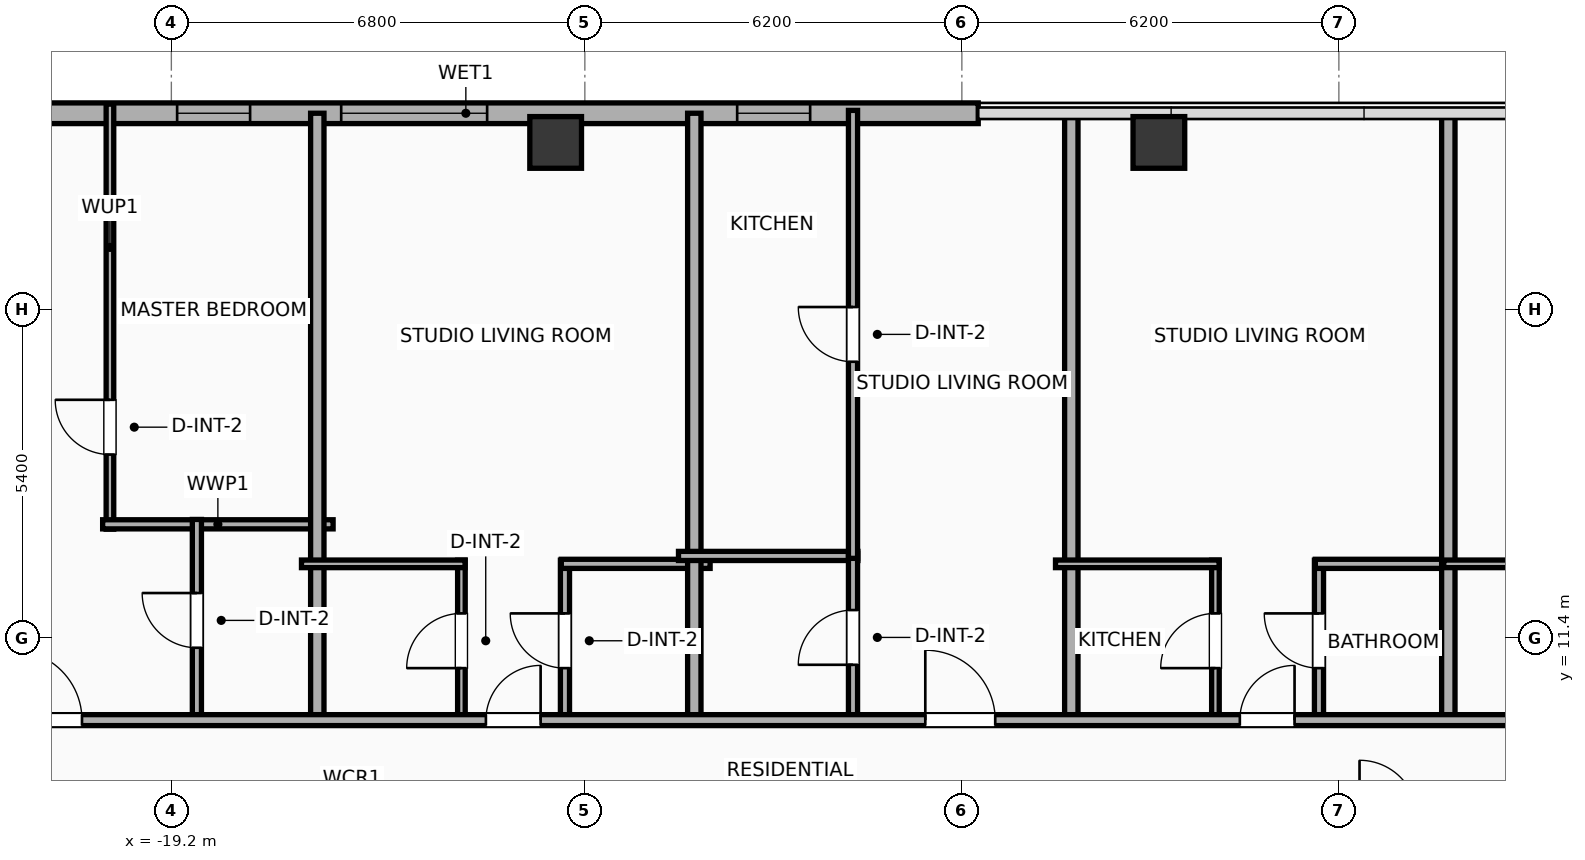
"""IFC4 building model, lengths in metres.
Left out: names, types, materials, properties, quantities, classifications, styles, units other than length and angle.
Written with IfcOpenShell. Run it as: python <this file> out.ifc"""

import sys

from ifc_helpers import new_model, si_unit, direction, frame, frame_2d, origin, origin_2d, place, context, subcontext, project, spatial, rectangle, hollow_rectangle, extrude, element, fill, save


model = new_model("IFC4")
c1 = context("Model", 3, precision=1e-05, world=origin(), true_north=direction((0.0, 1.0)))
c2 = subcontext(c1, "Body", "Model", "MODEL_VIEW")
j1 = project(units=[si_unit("LENGTHUNIT", "METRE"), si_unit("PLANEANGLEUNIT", "RADIAN")], contexts=[c1])
p1 = place(None, origin())
s1 = spatial("IfcSite", under=j1, at=p1, CompositionType="ELEMENT")
p2 = place(p1, origin())
s2 = spatial("IfcBuilding", under=s1, at=p2, CompositionType="ELEMENT")
p3 = place(p2, frame((0.0, 0.0, 211.9)))
s3 = spatial("IfcBuildingStorey", under=s2, at=p3, CompositionType="ELEMENT", Elevation=211.9)
for number, where, z_axis, x_axis in (
    (1, (-2.96, 19.55, 0.0), (0.0, 0.0, 1.0), (1.0, 0.0, 0.0)),
    (2, (-12.88, 19.55, 0.0), (0.0, 0.0, 1.0), (1.0, 0.0, 0.0)),
):
    element("IfcColumn", number, at=place(p3, frame(where, z_axis=z_axis, x_axis=x_axis)), inside=s3, PredefinedType="COLUMN", context=c2, shape_type="SweptSolid", body=[
        extrude(hollow_rectangle(XDim=0.85, YDim=0.85, WallThickness=0.028, at=origin_2d()), origin(), (0.0, 0.0, 1.0), 3.9),
    ])
p4 = place(p3, frame((-22.783, 20.03, 0.0), z_axis=(0.0, 0.0, 1.0), x_axis=(1.0, 0.0, 0.0)))
e3 = element("IfcWall", 3, at=p4, inside=s3, PredefinedType="ELEMENTEDWALL", context=c2, shape_type="SweptSolid", body=[
    extrude(rectangle(XDim=16.853, YDim=0.34, at=frame_2d((8.426, 0.0))), origin(), (0.0, 0.0, 1.0), 3.65),
])
p5 = place(p4, frame((6.376, 0.0, 0.75)))
e4 = element("IfcOpeningElement", 4, at=p5, cuts=e3, PredefinedType="OPENING", context=c2, shape_type="SweptSolid", body=[
    extrude(rectangle(XDim=2.4, YDim=2.1, at=frame_2d((1.2, 1.05))), frame((0.0, 0.18, 0.0), z_axis=(0.0, -1.0, 0.0), x_axis=(1.0, 0.0, 0.0)), (0.0, 0.0, 1.0), 0.36),
])
p6 = place(p4, frame((3.678, 0.0, 0.75)))
e5 = element("IfcOpeningElement", 5, at=p6, cuts=e3, PredefinedType="OPENING", context=c2, shape_type="SweptSolid", body=[
    extrude(rectangle(XDim=1.2, YDim=2.05, at=frame_2d((0.6, 1.025))), frame((0.0, 0.18, 0.0), z_axis=(0.0, -1.0, 0.0), x_axis=(1.0, 0.0, 0.0)), (0.0, 0.0, 1.0), 0.36),
])
p7 = place(p4, frame((12.888, 0.0, 0.75)))
e6 = element("IfcOpeningElement", 6, at=p7, cuts=e3, PredefinedType="OPENING", context=c2, shape_type="SweptSolid", body=[
    extrude(rectangle(XDim=1.2, YDim=2.05, at=frame_2d((0.6, 1.025))), frame((0.0, 0.18, 0.0), z_axis=(0.0, -1.0, 0.0), x_axis=(1.0, 0.0, 0.0)), (0.0, 0.0, 1.0), 0.36),
])
p8 = place(p3, frame((-20.21, 13.19, 0.0), z_axis=(0.0, 0.0, 1.0), x_axis=(0.0, 1.0, 0.0)))
e7 = element("IfcWall", 7, at=p8, inside=s3, PredefinedType="PARTITIONING", context=c2, shape_type="SweptSolid", body=[
    extrude(rectangle(XDim=6.99, YDim=0.125, at=frame_2d((3.495, 0.0))), origin(), (0.0, 0.0, 1.0), 3.65),
])
p9 = place(p8, frame((1.228, 0.0, 0.0)))
e8 = element("IfcOpeningElement", 8, at=p9, cuts=e7, PredefinedType="OPENING", context=c2, shape_type="SweptSolid", body=[
    extrude(rectangle(XDim=0.9, YDim=2.05, at=frame_2d((0.45, 1.025))), frame((0.0, 0.073, 0.0), z_axis=(0.0, -1.0, 0.0), x_axis=(1.0, 0.0, 0.0)), (0.0, 0.0, 1.0), 0.145),
])
p10 = place(p3, frame((-20.33, 13.27, 0.0), z_axis=(0.0, 0.0, 1.0), x_axis=(1.0, 0.0, 0.0)))
e9 = element("IfcWall", 9, at=p10, inside=s3, PredefinedType="PLUMBINGWALL", context=c2, shape_type="SweptSolid", body=[
    extrude(rectangle(XDim=3.79, YDim=0.15, at=frame_2d((1.895, 0.0))), origin(), (0.0, 0.0, 1.0), 3.65),
])
p11 = place(p3, frame((-18.78, 10.03, 0.0), z_axis=(0.0, 0.0, 1.0), x_axis=(0.0, 1.0, 0.0)))
e10 = element("IfcWall", 10, at=p11, inside=s3, PredefinedType="PLUMBINGWALL", context=c2, shape_type="SweptSolid", body=[
    extrude(rectangle(XDim=3.32, YDim=0.15, at=frame_2d((1.66, 0.0))), origin(), (0.0, 0.0, 1.0), 3.65),
])
p12 = place(p11, frame((1.21, 0.0, 0.0)))
e11 = element("IfcOpeningElement", 11, at=p12, cuts=e10, PredefinedType="OPENING", context=c2, shape_type="SweptSolid", body=[
    extrude(rectangle(XDim=0.9, YDim=2.05, at=frame_2d((0.45, 1.025))), frame((0.0, 0.085, 0.0), z_axis=(0.0, -1.0, 0.0), x_axis=(1.0, 0.0, 0.0)), (0.0, 0.0, 1.0), 0.17),
])
p13 = place(p3, frame((-16.8, 9.97, 0.0), z_axis=(0.0, 0.0, 1.0), x_axis=(0.0, 1.0, 0.0)))
e12 = element("IfcWall", 12, at=p13, inside=s3, PredefinedType="PARTITIONING", context=c2, shape_type="SweptSolid", body=[
    extrude(rectangle(XDim=10.06, YDim=0.22, at=frame_2d((5.03, 0.0))), origin(), (0.0, 0.0, 1.0), 3.65),
])
p14 = place(p3, frame((-14.43, 10.03, 0.0), z_axis=(0.0, 0.0, 1.0), x_axis=(0.0, 1.0, 0.0)))
e13 = element("IfcWall", 13, at=p14, inside=s3, PredefinedType="PARTITIONING", context=c2, shape_type="SweptSolid", body=[
    extrude(rectangle(XDim=2.65, YDim=0.125, at=frame_2d((1.325, 0.0))), origin(), (0.0, 0.0, 1.0), 3.65),
])
p15 = place(p14, frame((0.875, 0.0, 0.0)))
e14 = element("IfcOpeningElement", 14, at=p15, cuts=e13, PredefinedType="OPENING", context=c2, shape_type="SweptSolid", body=[
    extrude(rectangle(XDim=0.9, YDim=2.05, at=frame_2d((0.45, 1.025))), frame((0.0, 0.073, 0.0), z_axis=(0.0, -1.0, 0.0), x_axis=(1.0, 0.0, 0.0)), (0.0, 0.0, 1.0), 0.145),
])
p16 = place(p3, frame((-12.727, 10.03, 0.0), z_axis=(0.0, 0.0, 1.0), x_axis=(0.0, 1.0, 0.0)))
e15 = element("IfcWall", 15, at=p16, inside=s3, PredefinedType="PLUMBINGWALL", context=c2, shape_type="SweptSolid", body=[
    extrude(rectangle(XDim=2.65, YDim=0.15, at=frame_2d((1.325, 0.0))), origin(), (0.0, 0.0, 1.0), 3.09),
])
p17 = place(p16, frame((0.875, 0.0, 0.0)))
e16 = element("IfcOpeningElement", 16, at=p17, cuts=e15, PredefinedType="OPENING", context=c2, shape_type="SweptSolid", body=[
    extrude(rectangle(XDim=0.9, YDim=2.05, at=frame_2d((0.45, 1.025))), frame((0.0, 0.085, 0.0), z_axis=(0.0, -1.0, 0.0), x_axis=(1.0, 0.0, 0.0)), (0.0, 0.0, 1.0), 0.17),
])
p18 = place(p3, frame((-17.06, 12.62, 0.0), z_axis=(0.0, 0.0, 1.0), x_axis=(1.0, 0.0, 0.0)))
e17 = element("IfcWall", 17, at=p18, inside=s3, PredefinedType="PARTITIONING", context=c2, shape_type="SweptSolid", body=[
    extrude(rectangle(XDim=2.69, YDim=0.125, at=frame_2d((1.345, 0.0))), origin(), (0.0, 0.0, 1.0), 3.65),
])
p19 = place(p3, frame((-12.787, 12.62, 0.0), z_axis=(0.0, 0.0, 1.0), x_axis=(1.0, 0.0, 0.0)))
e18 = element("IfcWall", 18, at=p19, inside=s3, PredefinedType="PLUMBINGWALL", context=c2, shape_type="SweptSolid", body=[
    extrude(rectangle(XDim=2.447, YDim=0.15, at=frame_2d((1.224, 0.0))), origin(), (0.0, 0.0, 1.0), 3.65),
])
p20 = place(p3, frame((-10.6, 9.97, 0.0), z_axis=(0.0, 0.0, 1.0), x_axis=(0.0, 1.0, 0.0)))
e19 = element("IfcWall", 19, at=p20, inside=s3, PredefinedType="PARTITIONING", context=c2, shape_type="SweptSolid", body=[
    extrude(rectangle(XDim=10.06, YDim=0.22, at=frame_2d((5.03, 0.0))), origin(), (0.0, 0.0, 1.0), 3.65),
])
p21 = place(p3, frame((-10.86, 12.75, 0.0), z_axis=(0.0, 0.0, 1.0), x_axis=(1.0, 0.0, 0.0)))
e20 = element("IfcWall", 20, at=p21, inside=s3, PredefinedType="PLUMBINGWALL", context=c2, shape_type="SweptSolid", body=[
    extrude(rectangle(XDim=2.95, YDim=0.15, at=frame_2d((1.475, 0.0))), origin(), (0.0, 0.0, 1.0), 3.65),
])
p22 = place(p3, frame((-7.99, 10.03, 0.0), z_axis=(0.0, 0.0, 1.0), x_axis=(0.0, 1.0, 0.0)))
e21 = element("IfcWall", 21, at=p22, inside=s3, PredefinedType="PLUMBINGWALL", context=c2, shape_type="SweptSolid", body=[
    extrude(rectangle(XDim=2.76, YDim=0.15, at=frame_2d((1.38, 0.0))), origin(), (0.0, 0.0, 1.0), 3.65),
])
p23 = place(p22, frame((0.93, 0.0, 0.0)))
e22 = element("IfcOpeningElement", 22, at=p23, cuts=e21, PredefinedType="OPENING", context=c2, shape_type="SweptSolid", body=[
    extrude(rectangle(XDim=0.9, YDim=2.05, at=frame_2d((0.45, 1.025))), frame((0.0, 0.085, 0.0), z_axis=(0.0, -1.0, 0.0), x_axis=(1.0, 0.0, 0.0)), (0.0, 0.0, 1.0), 0.17),
])
p24 = place(p3, frame((-7.99, 12.71, 0.0), z_axis=(0.0, 0.0, 1.0), x_axis=(0.0, 1.0, 0.0)))
e23 = element("IfcWall", 23, at=p24, inside=s3, PredefinedType="PLUMBINGWALL", context=c2, shape_type="SweptSolid", body=[
    extrude(rectangle(XDim=7.367, YDim=0.15, at=frame_2d((3.684, 0.0))), origin(), (0.0, 0.0, 1.0), 3.65),
])
p25 = place(p24, frame((3.233, 0.0, 0.0)))
e24 = element("IfcOpeningElement", 24, at=p25, cuts=e23, PredefinedType="OPENING", context=c2, shape_type="SweptSolid", body=[
    extrude(rectangle(XDim=0.9, YDim=2.05, at=frame_2d((0.45, 1.025))), frame((0.0, 0.085, 0.0), z_axis=(0.0, -1.0, 0.0), x_axis=(1.0, 0.0, 0.0)), (0.0, 0.0, 1.0), 0.17),
])
p26 = place(p3, frame((-4.4, 9.97, 0.0), z_axis=(0.0, 0.0, 1.0), x_axis=(0.0, 1.0, 0.0)))
e25 = element("IfcWall", 25, at=p26, inside=s3, PredefinedType="PARTITIONING", context=c2, shape_type="SweptSolid", body=[
    extrude(rectangle(XDim=10.06, YDim=0.22, at=frame_2d((5.03, 0.0))), origin(), (0.0, 0.0, 1.0), 3.65),
])
p27 = place(p3, frame((-2.03, 10.03, 0.0), z_axis=(0.0, 0.0, 1.0), x_axis=(0.0, 1.0, 0.0)))
e26 = element("IfcWall", 26, at=p27, inside=s3, PredefinedType="PARTITIONING", context=c2, shape_type="SweptSolid", body=[
    extrude(rectangle(XDim=2.65, YDim=0.125, at=frame_2d((1.325, 0.0))), origin(), (0.0, 0.0, 1.0), 3.65),
])
p28 = place(p27, frame((0.875, 0.0, 0.0)))
e27 = element("IfcOpeningElement", 27, at=p28, cuts=e26, PredefinedType="OPENING", context=c2, shape_type="SweptSolid", body=[
    extrude(rectangle(XDim=0.9, YDim=2.05, at=frame_2d((0.45, 1.025))), frame((0.0, 0.073, 0.0), z_axis=(0.0, -1.0, 0.0), x_axis=(1.0, 0.0, 0.0)), (0.0, 0.0, 1.0), 0.145),
])
p29 = place(p3, frame((-0.327, 10.03, 0.0), z_axis=(0.0, 0.0, 1.0), x_axis=(0.0, 1.0, 0.0)))
e28 = element("IfcWall", 28, at=p29, inside=s3, PredefinedType="PLUMBINGWALL", context=c2, shape_type="SweptSolid", body=[
    extrude(rectangle(XDim=2.65, YDim=0.15, at=frame_2d((1.325, 0.0))), origin(), (0.0, 0.0, 1.0), 3.65),
])
p30 = place(p29, frame((0.875, 0.0, 0.0)))
e29 = element("IfcOpeningElement", 29, at=p30, cuts=e28, PredefinedType="OPENING", context=c2, shape_type="SweptSolid", body=[
    extrude(rectangle(XDim=0.9, YDim=2.05, at=frame_2d((0.45, 1.025))), frame((0.0, 0.085, 0.0), z_axis=(0.0, -1.0, 0.0), x_axis=(1.0, 0.0, 0.0)), (0.0, 0.0, 1.0), 0.17),
])
p31 = place(p3, frame((-4.66, 12.62, 0.0), z_axis=(0.0, 0.0, 1.0), x_axis=(1.0, 0.0, 0.0)))
e30 = element("IfcWall", 30, at=p31, inside=s3, PredefinedType="PARTITIONING", context=c2, shape_type="SweptSolid", body=[
    extrude(rectangle(XDim=2.69, YDim=0.125, at=frame_2d((1.345, 0.0))), origin(), (0.0, 0.0, 1.0), 3.65),
])
p32 = place(p3, frame((-0.387, 12.62, 0.0), z_axis=(0.0, 0.0, 1.0), x_axis=(1.0, 0.0, 0.0)))
e31 = element("IfcWall", 31, at=p32, inside=s3, PredefinedType="PLUMBINGWALL", context=c2, shape_type="SweptSolid", body=[
    extrude(rectangle(XDim=2.262, YDim=0.15, at=frame_2d((1.131, 0.0))), origin(), (0.0, 0.0, 1.0), 3.65),
])
p33 = place(p3, frame((1.8, 9.97, 0.0), z_axis=(0.0, 0.0, 1.0), x_axis=(0.0, 1.0, 0.0)))
e32 = element("IfcWall", 32, at=p33, inside=s3, PredefinedType="PARTITIONING", context=c2, shape_type="SweptSolid", body=[
    extrude(rectangle(XDim=10.06, YDim=0.22, at=frame_2d((5.03, 0.0))), origin(), (0.0, 0.0, 1.0), 3.65),
])
p34 = place(p3, frame((1.725, 12.62, 0.0), z_axis=(0.0, 0.0, 1.0), x_axis=(1.0, 0.0, 0.0)))
e33 = element("IfcWall", 33, at=p34, inside=s3, PredefinedType="PARTITIONING", context=c2, shape_type="SweptSolid", body=[
    extrude(rectangle(XDim=2.505, YDim=0.125, at=frame_2d((1.252, 0.0))), origin(), (0.0, 0.0, 1.0), 3.65),
])
p35 = place(p3, frame((-26.23, 10.05, 0.0), z_axis=(0.0, 0.0, 1.0), x_axis=(1.0, 0.0, 0.0)))
e34 = element("IfcWall", 34, at=p35, inside=s3, PredefinedType="PARTITIONING", context=c2, shape_type="SweptSolid", body=[
    extrude(rectangle(XDim=56.46, YDim=0.18, at=frame_2d((28.23, 0.0))), origin(), (0.0, 0.0, 1.0), 3.65),
])
p36 = place(p35, frame((4.41, 0.0, 0.0)))
e35 = element("IfcOpeningElement", 35, at=p36, cuts=e34, PredefinedType="OPENING", context=c2, shape_type="SweptSolid", body=[
    extrude(rectangle(XDim=1.15, YDim=2.05, at=frame_2d((0.575, 1.025))), frame((0.0, 0.1, 0.0), z_axis=(0.0, -1.0, 0.0), x_axis=(1.0, 0.0, 0.0)), (0.0, 0.0, 1.0), 0.2),
])
p37 = place(p35, frame((12.203, 0.0, 0.0)))
e36 = element("IfcOpeningElement", 36, at=p37, cuts=e34, PredefinedType="OPENING", context=c2, shape_type="SweptSolid", body=[
    extrude(rectangle(XDim=0.9, YDim=2.05, at=frame_2d((0.45, 1.025))), frame((0.0, 0.1, 0.0), z_axis=(0.0, -1.0, 0.0), x_axis=(1.0, 0.0, 0.0)), (0.0, 0.0, 1.0), 0.2),
])
p38 = place(p35, frame((19.429, 0.0, 0.0)))
e37 = element("IfcOpeningElement", 37, at=p38, cuts=e34, PredefinedType="OPENING", context=c2, shape_type="SweptSolid", body=[
    extrude(rectangle(XDim=1.15, YDim=2.05, at=frame_2d((0.575, 1.025))), frame((0.0, 0.1, 0.0), z_axis=(0.0, -1.0, 0.0), x_axis=(1.0, 0.0, 0.0)), (0.0, 0.0, 1.0), 0.2),
])
p39 = place(p35, frame((24.601, 0.0, 0.0)))
e38 = element("IfcOpeningElement", 38, at=p39, cuts=e34, PredefinedType="OPENING", context=c2, shape_type="SweptSolid", body=[
    extrude(rectangle(XDim=0.9, YDim=2.05, at=frame_2d((0.45, 1.025))), frame((0.0, 0.1, 0.0), z_axis=(0.0, -1.0, 0.0), x_axis=(1.0, 0.0, 0.0)), (0.0, 0.0, 1.0), 0.2),
])
p40 = place(p35, frame((30.801, 0.0, 0.0)))
e39 = element("IfcOpeningElement", 39, at=p40, cuts=e34, PredefinedType="OPENING", context=c2, shape_type="SweptSolid", body=[
    extrude(rectangle(XDim=0.9, YDim=2.05, at=frame_2d((0.45, 1.025))), frame((0.0, 0.1, 0.0), z_axis=(0.0, -1.0, 0.0), x_axis=(1.0, 0.0, 0.0)), (0.0, 0.0, 1.0), 0.2),
])
p41 = place(p35, frame((35.52, 0.0, 0.0)))
e40 = element("IfcOpeningElement", 40, at=p41, cuts=e34, PredefinedType="OPENING", context=c2, shape_type="SweptSolid", body=[
    extrude(rectangle(XDim=1.15, YDim=2.05, at=frame_2d((0.575, 1.025))), frame((0.0, 0.1, 0.0), z_axis=(0.0, -1.0, 0.0), x_axis=(1.0, 0.0, 0.0)), (0.0, 0.0, 1.0), 0.2),
])
p42 = place(p35, frame((43.199, 0.0, 0.0)))
e41 = element("IfcOpeningElement", 41, at=p42, cuts=e34, PredefinedType="OPENING", context=c2, shape_type="SweptSolid", body=[
    extrude(rectangle(XDim=0.9, YDim=2.05, at=frame_2d((0.45, 1.025))), frame((0.0, 0.1, 0.0), z_axis=(0.0, -1.0, 0.0), x_axis=(1.0, 0.0, 0.0)), (0.0, 0.0, 1.0), 0.2),
])
p43 = place(p35, frame((51.334, 0.0, 0.0)))
e42 = element("IfcOpeningElement", 42, at=p43, cuts=e34, PredefinedType="OPENING", context=c2, shape_type="SweptSolid", body=[
    extrude(rectangle(XDim=1.15, YDim=2.05, at=frame_2d((0.575, 1.025))), frame((0.0, 0.1, 0.0), z_axis=(0.0, -1.0, 0.0), x_axis=(1.0, 0.0, 0.0)), (0.0, 0.0, 1.0), 0.2),
])
p44 = place(p5, origin())
e43 = element("IfcWindow", 43, at=p44, inside=s3, PartitioningType="SINGLE_PANEL", PredefinedType="WINDOW", context=c2, shape_type="SweptSolid", body=[
    extrude(rectangle(XDim=2.4, YDim=2.1, at=frame_2d((1.2, 1.05))), frame((0.0, 0.03, 0.0), z_axis=(0.0, -1.0, 0.0), x_axis=(1.0, 0.0, 0.0)), (0.0, 0.0, 1.0), 0.06),
])
fill(e4, e43)
p45 = place(p6, origin())
e44 = element("IfcWindow", 44, at=p45, inside=s3, PartitioningType="SINGLE_PANEL", PredefinedType="WINDOW", context=c2, shape_type="SweptSolid", body=[
    extrude(rectangle(XDim=1.2, YDim=2.05, at=frame_2d((0.6, 1.025))), frame((0.0, 0.03, 0.0), z_axis=(0.0, -1.0, 0.0), x_axis=(1.0, 0.0, 0.0)), (0.0, 0.0, 1.0), 0.06),
])
fill(e5, e44)
p46 = place(p7, origin())
e45 = element("IfcWindow", 45, at=p46, inside=s3, PartitioningType="SINGLE_PANEL", PredefinedType="WINDOW", context=c2, shape_type="SweptSolid", body=[
    extrude(rectangle(XDim=1.2, YDim=2.05, at=frame_2d((0.6, 1.025))), frame((0.0, 0.03, 0.0), z_axis=(0.0, -1.0, 0.0), x_axis=(1.0, 0.0, 0.0)), (0.0, 0.0, 1.0), 0.06),
])
fill(e6, e45)
p47 = place(p9, origin())
e46 = element("IfcDoor", 46, at=p47, inside=s3, OperationType="SINGLE_SWING_RIGHT", PredefinedType="DOOR", context=c2, shape_type="SweptSolid", body=[
    extrude(rectangle(XDim=0.9, YDim=2.05, at=frame_2d((0.45, 1.025))), frame((0.0, 0.025, 0.0), z_axis=(0.0, -1.0, 0.0), x_axis=(1.0, 0.0, 0.0)), (0.0, 0.0, 1.0), 0.05),
])
fill(e8, e46)
p48 = place(p12, origin())
e47 = element("IfcDoor", 47, at=p48, inside=s3, OperationType="SINGLE_SWING_RIGHT", PredefinedType="DOOR", context=c2, shape_type="SweptSolid", body=[
    extrude(rectangle(XDim=0.9, YDim=2.05, at=frame_2d((0.45, 1.025))), frame((0.0, 0.025, 0.0), z_axis=(0.0, -1.0, 0.0), x_axis=(1.0, 0.0, 0.0)), (0.0, 0.0, 1.0), 0.05),
])
fill(e11, e47)
p49 = place(p15, origin())
e48 = element("IfcDoor", 48, at=p49, inside=s3, OperationType="SINGLE_SWING_LEFT", PredefinedType="DOOR", context=c2, shape_type="SweptSolid", body=[
    extrude(rectangle(XDim=0.9, YDim=2.05, at=frame_2d((0.45, 1.025))), frame((0.0, 0.025, 0.0), z_axis=(0.0, -1.0, 0.0), x_axis=(1.0, 0.0, 0.0)), (0.0, 0.0, 1.0), 0.05),
])
fill(e14, e48)
p50 = place(p17, origin())
e49 = element("IfcDoor", 49, at=p50, inside=s3, OperationType="SINGLE_SWING_RIGHT", PredefinedType="DOOR", context=c2, shape_type="SweptSolid", body=[
    extrude(rectangle(XDim=0.9, YDim=2.05, at=frame_2d((0.45, 1.025))), frame((0.0, 0.025, 0.0), z_axis=(0.0, -1.0, 0.0), x_axis=(1.0, 0.0, 0.0)), (0.0, 0.0, 1.0), 0.05),
])
fill(e16, e49)
p51 = place(p23, origin())
e50 = element("IfcDoor", 50, at=p51, inside=s3, OperationType="SINGLE_SWING_LEFT", PredefinedType="DOOR", context=c2, shape_type="SweptSolid", body=[
    extrude(rectangle(XDim=0.9, YDim=2.05, at=frame_2d((0.45, 1.025))), frame((0.0, 0.025, 0.0), z_axis=(0.0, -1.0, 0.0), x_axis=(1.0, 0.0, 0.0)), (0.0, 0.0, 1.0), 0.05),
])
fill(e22, e50)
p52 = place(p25, origin())
e51 = element("IfcDoor", 51, at=p52, inside=s3, OperationType="SINGLE_SWING_RIGHT", PredefinedType="DOOR", context=c2, shape_type="SweptSolid", body=[
    extrude(rectangle(XDim=0.9, YDim=2.05, at=frame_2d((0.45, 1.025))), frame((0.0, 0.025, 0.0), z_axis=(0.0, -1.0, 0.0), x_axis=(1.0, 0.0, 0.0)), (0.0, 0.0, 1.0), 0.05),
])
fill(e24, e51)
p53 = place(p28, origin())
e52 = element("IfcDoor", 52, at=p53, inside=s3, OperationType="SINGLE_SWING_LEFT", PredefinedType="DOOR", context=c2, shape_type="SweptSolid", body=[
    extrude(rectangle(XDim=0.9, YDim=2.05, at=frame_2d((0.45, 1.025))), frame((0.0, 0.025, 0.0), z_axis=(0.0, -1.0, 0.0), x_axis=(1.0, 0.0, 0.0)), (0.0, 0.0, 1.0), 0.05),
])
fill(e27, e52)
p54 = place(p30, origin())
e53 = element("IfcDoor", 53, at=p54, inside=s3, OperationType="SINGLE_SWING_RIGHT", PredefinedType="DOOR", context=c2, shape_type="SweptSolid", body=[
    extrude(rectangle(XDim=0.9, YDim=2.05, at=frame_2d((0.45, 1.025))), frame((0.0, 0.025, 0.0), z_axis=(0.0, -1.0, 0.0), x_axis=(1.0, 0.0, 0.0)), (0.0, 0.0, 1.0), 0.05),
])
fill(e29, e53)
p55 = place(p36, origin())
e54 = element("IfcDoor", 54, at=p55, inside=s3, OperationType="SINGLE_SWING_LEFT", PredefinedType="DOOR", context=c2, shape_type="SweptSolid", body=[
    extrude(rectangle(XDim=1.15, YDim=2.05, at=frame_2d((0.575, 1.025))), frame((0.0, 0.025, 0.0), z_axis=(0.0, -1.0, 0.0), x_axis=(1.0, 0.0, 0.0)), (0.0, 0.0, 1.0), 0.05),
])
fill(e35, e54)
p56 = place(p37, origin())
e55 = element("IfcDoor", 55, at=p56, inside=s3, OperationType="SINGLE_SWING_RIGHT", PredefinedType="DOOR", context=c2, shape_type="SweptSolid", body=[
    extrude(rectangle(XDim=0.9, YDim=2.05, at=frame_2d((0.45, 1.025))), frame((0.0, 0.025, 0.0), z_axis=(0.0, -1.0, 0.0), x_axis=(1.0, 0.0, 0.0)), (0.0, 0.0, 1.0), 0.05),
])
fill(e36, e55)
p57 = place(p38, origin())
e56 = element("IfcDoor", 56, at=p57, inside=s3, OperationType="SINGLE_SWING_LEFT", PredefinedType="DOOR", context=c2, shape_type="SweptSolid", body=[
    extrude(rectangle(XDim=1.15, YDim=2.05, at=frame_2d((0.575, 1.025))), frame((0.0, 0.025, 0.0), z_axis=(0.0, -1.0, 0.0), x_axis=(1.0, 0.0, 0.0)), (0.0, 0.0, 1.0), 0.05),
])
fill(e37, e56)
p58 = place(p39, origin())
e57 = element("IfcDoor", 57, at=p58, inside=s3, OperationType="SINGLE_SWING_RIGHT", PredefinedType="DOOR", context=c2, shape_type="SweptSolid", body=[
    extrude(rectangle(XDim=0.9, YDim=2.05, at=frame_2d((0.45, 1.025))), frame((0.0, 0.025, 0.0), z_axis=(0.0, -1.0, 0.0), x_axis=(1.0, 0.0, 0.0)), (0.0, 0.0, 1.0), 0.05),
])
fill(e38, e57)
save(model, sys.argv[1])
